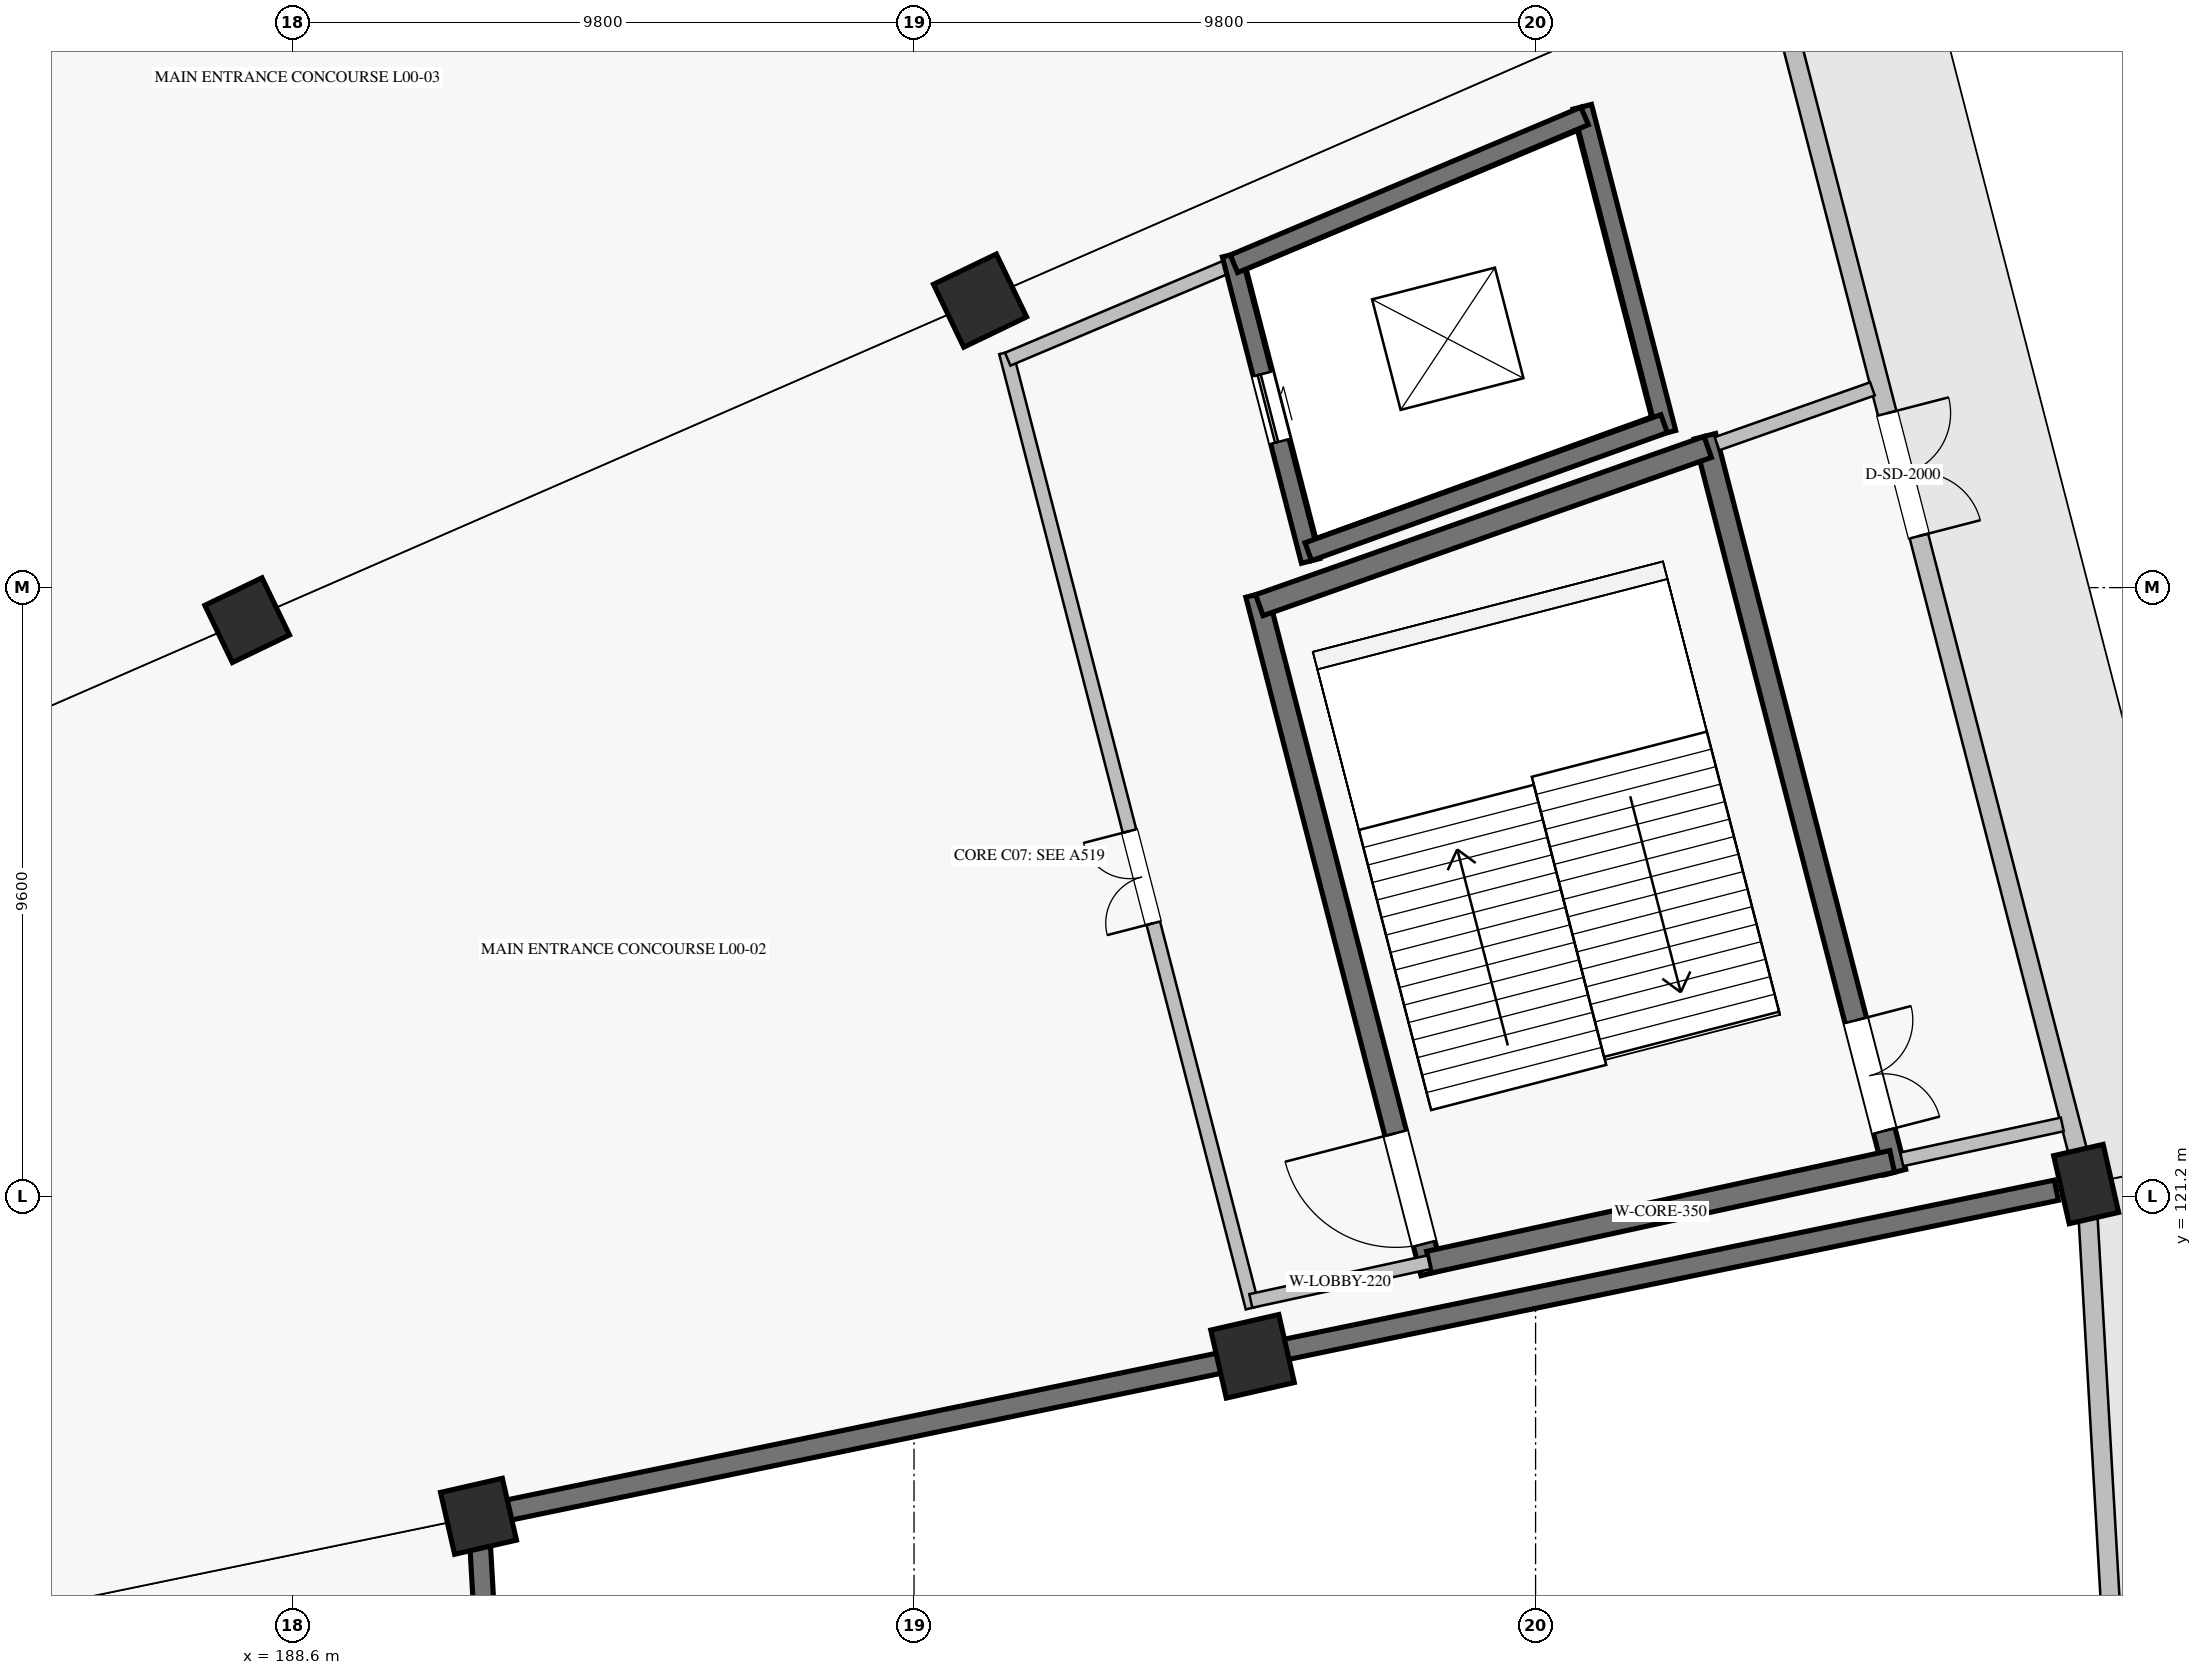
"""IFC4 building model, lengths in metres.
Left out: names, types, materials, properties, quantities, classifications, styles, units other than length and angle.
Written with IfcOpenShell. Run it as: python <this file> out.ifc"""

import sys

from ifc_helpers import new_model, si_unit, direction, frame, frame_2d, origin, origin_2d, place, context, subcontext, project, spatial, rectangle, extrude, element, fill, save


model = new_model("IFC4")
c1 = context("Model", 3, precision=1e-05, world=origin(), true_north=direction((0.0, 1.0)))
c2 = subcontext(c1, "Body", "Model", "MODEL_VIEW")
j1 = project(units=[si_unit("LENGTHUNIT", "METRE"), si_unit("PLANEANGLEUNIT", "RADIAN")], contexts=[c1])
p1 = place(None, origin())
s1 = spatial("IfcSite", under=j1, at=p1, CompositionType="ELEMENT")
p2 = place(p1, origin())
s2 = spatial("IfcBuilding", under=s1, at=p2, CompositionType="ELEMENT")
p3 = place(p2, origin())
s3 = spatial("IfcBuildingStorey", under=s2, at=p3, CompositionType="ELEMENT", Elevation=0.0)
for number, where, z_axis, x_axis in (
    (1, (191.533, 116.16, 0.0), (0.0, 0.0, 1.0), (0.975, 0.223, 0.0)),
    (2, (187.886, 130.287, 0.0), (0.0, 0.0, 1.0), (0.901, 0.434, 0.0)),
):
    element("IfcColumn", number, at=place(p3, frame(where, z_axis=z_axis, x_axis=x_axis)), inside=s3, PredefinedType="COLUMN", context=c2, shape_type="SweptSolid", body=[
        extrude(rectangle(XDim=1.0, YDim=1.0, at=origin_2d()), origin(), (0.0, 0.0, 1.0), 5.78),
    ])
for number, where, z_axis, x_axis in (
    (3, (203.738, 118.682, 0.0), (0.0, 0.0, 1.0), (0.975, 0.223, 0.0)),
    (4, (199.441, 135.325, 0.0), (0.0, 0.0, 1.0), (0.901, 0.434, 0.0)),
):
    element("IfcColumn", number, at=place(p3, frame(where, z_axis=z_axis, x_axis=x_axis)), inside=s3, PredefinedType="COLUMN", context=c2, shape_type="SweptSolid", body=[
        extrude(rectangle(XDim=1.1, YDim=1.1, at=origin_2d()), origin(), (0.0, 0.0, 1.0), 5.78),
    ])
p4 = place(p3, frame((216.881, 121.398, 0.0), z_axis=(0.0, 0.0, 1.0), x_axis=(0.974927912182, 0.222520933954, 0.0)))
e5 = element("IfcColumn", 5, at=p4, inside=s3, PredefinedType="COLUMN", context=c2, shape_type="SweptSolid", body=[
    extrude(rectangle(XDim=0.8, YDim=1.1, at=origin_2d()), origin(), (0.0, 0.0, 1.0), 5.78),
])
p5 = place(p3, frame((217.978, 102.389, 0.0), z_axis=(0.0, 0.0, 1.0), x_axis=(-0.057599295107, 0.99833978244, 0.0)))
e6 = element("IfcWall", 6, at=p5, inside=s3, PredefinedType="SOLIDWALL", context=c2, shape_type="SweptSolid", body=[
    extrude(rectangle(XDim=18.65, YDim=0.3, at=frame_2d((9.325, 0.0))), origin(), (0.0, 0.0, 1.0), 4.8),
])
p6 = place(p5, frame((7.075, 0.0, 0.0)))
e7 = element("IfcOpeningElement", 7, at=p6, cuts=e6, PredefinedType="OPENING", context=c2, shape_type="SweptSolid", body=[
    extrude(rectangle(XDim=4.5, YDim=4.2, at=frame_2d((2.25, 2.1))), frame((0.0, 0.16, 0.0), z_axis=(0.0, -1.0, 0.0), x_axis=(1.0, 0.0, 0.0)), (0.0, 0.0, 1.0), 0.32),
])
p7 = place(p3, frame((216.783, 121.775, 0.0), z_axis=(0.0, 0.0, 1.0), x_axis=(-0.249961059007, 0.968255890238, 0.0)))
e8 = element("IfcWall", 8, at=p7, inside=s3, PredefinedType="SOLIDWALL", context=c2, shape_type="SweptSolid", body=[
    extrude(rectangle(XDim=19.206, YDim=0.3, at=frame_2d((9.603, 0.0))), origin(), (0.0, 0.0, 1.0), 4.8),
])
p8 = place(p7, frame((10.16, 0.0, 0.0)))
e9 = element("IfcOpeningElement", 9, at=p8, cuts=e8, PredefinedType="OPENING", context=c2, shape_type="SweptSolid", body=[
    extrude(rectangle(XDim=2.0, YDim=2.3, at=frame_2d((1.0, 1.15))), frame((0.0, 0.16, 0.0), z_axis=(0.0, -1.0, 0.0), x_axis=(1.0, 0.0, 0.0)), (0.0, 0.0, 1.0), 0.32),
])
p9 = place(p3, frame((206.562, 119.996, 0.0), z_axis=(0.0, 0.0, 1.0), x_axis=(-0.249959564539, 0.968256276042, 0.0)))
e10 = element("IfcWall", 10, at=p9, inside=s3, PredefinedType="SHEAR", context=c2, shape_type="SweptSolid", body=[
    extrude(rectangle(XDim=11.047, YDim=0.35, at=frame_2d((5.523, 0.0))), origin(), (0.0, 0.0, 1.0), 5.5),
])
p10 = place(p9, frame((0.475, 0.0, 0.0)))
e11 = element("IfcOpeningElement", 11, at=p10, cuts=e10, PredefinedType="OPENING", context=c2, shape_type="SweptSolid", body=[
    extrude(rectangle(XDim=1.8, YDim=2.2, at=frame_2d((0.9, 1.1))), frame((0.0, 0.185, 0.0), z_axis=(0.0, -1.0, 0.0), x_axis=(1.0, 0.0, 0.0)), (0.0, 0.0, 1.0), 0.37),
])
p11 = place(p3, frame((213.866, 121.585, 0.0), z_axis=(0.0, 0.0, 1.0), x_axis=(-0.249969221583, 0.968253782983, 0.0)))
e12 = element("IfcWall", 12, at=p11, inside=s3, PredefinedType="SHEAR", context=c2, shape_type="SweptSolid", body=[
    extrude(rectangle(XDim=11.982, YDim=0.35, at=frame_2d((5.991, 0.0))), origin(), (0.0, 0.0, 1.0), 5.5),
])
p12 = place(p11, frame((0.672, 0.0, 0.0)))
e13 = element("IfcOpeningElement", 13, at=p12, cuts=e12, PredefinedType="OPENING", context=c2, shape_type="SweptSolid", body=[
    extrude(rectangle(XDim=1.8, YDim=2.2, at=frame_2d((0.9, 1.1))), frame((0.0, 0.185, 0.0), z_axis=(0.0, -1.0, 0.0), x_axis=(1.0, 0.0, 0.0)), (0.0, 0.0, 1.0), 0.37),
])
p13 = place(p3, frame((213.973, 121.787, 0.0), z_axis=(0.0, 0.0, 1.0), x_axis=(0.977161897059, 0.212496180991, 0.0)))
e14 = element("IfcWall", 14, at=p13, inside=s3, PredefinedType="SOLIDWALL", context=c2, shape_type="SweptSolid", body=[
    extrude(rectangle(XDim=2.59, YDim=0.22, at=frame_2d((1.295, 0.0))), origin(), (0.0, 0.0, 1.0), 5.5),
])
p14 = place(p3, frame((211.061, 133.069, 0.0), z_axis=(0.0, 0.0, 1.0), x_axis=(0.943023288659, 0.332726730285, 0.0)))
e15 = element("IfcWall", 15, at=p14, inside=s3, PredefinedType="SOLIDWALL", context=c2, shape_type="SweptSolid", body=[
    extrude(rectangle(XDim=2.598, YDim=0.22, at=frame_2d((1.299, 0.0))), origin(), (0.0, 0.0, 1.0), 5.5),
])
p15 = place(p3, frame((206.519, 120.166, 0.0), z_axis=(0.0, 0.0, 1.0), x_axis=(0.977149528138, 0.2125530514, 0.0)))
e16 = element("IfcWall", 16, at=p15, inside=s3, PredefinedType="SHEAR", context=c2, shape_type="SweptSolid", body=[
    extrude(rectangle(XDim=7.474, YDim=0.35, at=frame_2d((3.737, 0.0))), origin(), (0.0, 0.0, 1.0), 5.5),
])
p16 = place(p3, frame((203.845, 130.523, 0.0), z_axis=(0.0, 0.0, 1.0), x_axis=(0.943032412173, 0.332700871042, 0.0)))
e17 = element("IfcWall", 17, at=p16, inside=s3, PredefinedType="SHEAR", context=c2, shape_type="SweptSolid", body=[
    extrude(rectangle(XDim=7.497, YDim=0.35, at=frame_2d((3.748, 0.0))), origin(), (0.0, 0.0, 1.0), 5.5),
])
p17 = place(p3, frame((204.654, 131.221, 0.0), z_axis=(0.0, 0.0, 1.0), x_axis=(-0.250003862389, 0.968244839279, 0.0)))
e18 = element("IfcWall", 18, at=p17, inside=s3, PredefinedType="SHEAR", context=c2, shape_type="SweptSolid", body=[
    extrude(rectangle(XDim=4.987, YDim=0.3, at=frame_2d((2.494, 0.0))), origin(), (0.0, 0.0, 1.0), 5.5),
])
p18 = place(p17, frame((1.944, 0.0, 0.0)))
e19 = element("IfcOpeningElement", 19, at=p18, cuts=e18, PredefinedType="OPENING", context=c2, shape_type="SweptSolid", body=[
    extrude(rectangle(XDim=1.1, YDim=2.2, at=frame_2d((0.55, 1.1))), frame((0.0, 0.16, 0.0), z_axis=(0.0, -1.0, 0.0), x_axis=(1.0, 0.0, 0.0)), (0.0, 0.0, 1.0), 0.32),
])
p19 = place(p3, frame((210.264, 133.24, 0.0), z_axis=(0.0, 0.0, 1.0), x_axis=(-0.249961459705, 0.968255786795, 0.0)))
e20 = element("IfcWall", 20, at=p19, inside=s3, PredefinedType="SHEAR", context=c2, shape_type="SweptSolid", body=[
    extrude(rectangle(XDim=5.309, YDim=0.3, at=frame_2d((2.655, 0.0))), origin(), (0.0, 0.0, 1.0), 5.5),
])
p20 = place(p3, frame((204.616, 131.366, 0.0), z_axis=(0.0, 0.0, 1.0), x_axis=(0.940945340179, 0.338558513103, 0.0)))
e21 = element("IfcWall", 21, at=p20, inside=s3, PredefinedType="SHEAR", context=c2, shape_type="SweptSolid", body=[
    extrude(rectangle(XDim=5.962, YDim=0.3, at=frame_2d((2.981, 0.0))), origin(), (0.0, 0.0, 1.0), 5.5),
])
p21 = place(p3, frame((203.445, 135.905, 0.0), z_axis=(0.0, 0.0, 1.0), x_axis=(0.92149593043, 0.388388015007, 0.0)))
e22 = element("IfcWall", 22, at=p21, inside=s3, PredefinedType="SHEAR", context=c2, shape_type="SweptSolid", body=[
    extrude(rectangle(XDim=6.001, YDim=0.3, at=frame_2d((3.0, 0.0))), origin(), (0.0, 0.0, 1.0), 5.5),
])
p22 = place(p3, frame((203.737, 119.448, 0.0), z_axis=(0.0, 0.0, 1.0), x_axis=(-0.249963472505, 0.968255267176, 0.0)))
e23 = element("IfcWall", 23, at=p22, inside=s3, PredefinedType="SOLIDWALL", context=c2, shape_type="SweptSolid", body=[
    extrude(rectangle(XDim=15.553, YDim=0.22, at=frame_2d((7.776, 0.0))), origin(), (0.0, 0.0, 1.0), 4.448),
])
p23 = place(p22, frame((6.26, 0.0, 0.0)))
e24 = element("IfcOpeningElement", 24, at=p23, cuts=e23, PredefinedType="OPENING", context=c2, shape_type="SweptSolid", body=[
    extrude(rectangle(XDim=1.5, YDim=2.2, at=frame_2d((0.75, 1.1))), frame((0.0, 0.12, 0.0), z_axis=(0.0, -1.0, 0.0), x_axis=(1.0, 0.0, 0.0)), (0.0, 0.0, 1.0), 0.24),
])
p24 = place(p3, frame((203.71, 119.555, 0.0), z_axis=(0.0, 0.0, 1.0), x_axis=(0.977160263607, 0.212503692268, 0.0)))
e25 = element("IfcWall", 25, at=p24, inside=s3, PredefinedType="SOLIDWALL", context=c2, shape_type="SweptSolid", body=[
    extrude(rectangle(XDim=2.875, YDim=0.22, at=frame_2d((1.437, 0.0))), origin(), (0.0, 0.0, 1.0), 5.5),
])
p25 = place(p3, frame((199.877, 134.401, 0.0), z_axis=(0.0, 0.0, 1.0), x_axis=(0.921486922561, 0.388409386535, 0.0)))
e26 = element("IfcWall", 26, at=p25, inside=s3, PredefinedType="SOLIDWALL", context=c2, shape_type="SweptSolid", body=[
    extrude(rectangle(XDim=3.871, YDim=0.22, at=frame_2d((1.936, 0.0))), origin(), (0.0, 0.0, 1.0), 5.5),
])
p26 = place(p3, frame((192.322, 102.479, 0.0), z_axis=(0.0, 0.0, 1.0), x_axis=(-0.057601843043, 0.998339635434, 0.0)))
e27 = element("IfcWall", 27, at=p26, inside=s3, PredefinedType="SHEAR", context=c2, shape_type="SweptSolid", body=[
    extrude(rectangle(XDim=13.224, YDim=0.325, at=frame_2d((6.612, 0.0))), origin(), (0.0, 0.0, 1.0), 4.8),
])
p27 = place(p3, frame((192.003, 116.257, 0.0), z_axis=(0.0, 0.0, 1.0), x_axis=(0.979312995501, 0.202351320337, 0.0)))
e28 = element("IfcWall", 28, at=p27, inside=s3, PredefinedType="SHEAR", context=c2, shape_type="SweptSolid", body=[
    extrude(rectangle(XDim=24.923, YDim=0.325, at=frame_2d((12.461, 0.0))), origin(), (0.0, 0.0, 1.0), 4.8),
])
p28 = place(p8, frame((2.0, 0.0, 0.0), z_axis=(0.0, 0.0, 1.0), x_axis=(-1.0, 0.0, 0.0)))
e29 = element("IfcDoor", 29, at=p28, inside=s3, OperationType="DOUBLE_DOOR_SINGLE_SWING", PredefinedType="DOOR", context=c2, shape_type="SweptSolid", body=[
    extrude(rectangle(XDim=2.0, YDim=2.3, at=frame_2d((1.0, 1.15))), frame((0.0, 0.025, 0.0), z_axis=(0.0, -1.0, 0.0), x_axis=(1.0, 0.0, 0.0)), (0.0, 0.0, 1.0), 0.05),
])
fill(e9, e29)
p29 = place(p12, frame((1.8, 0.0, 0.0), z_axis=(0.0, 0.0, 1.0), x_axis=(-1.0, 0.0, 0.0)))
e30 = element("IfcDoor", 30, at=p29, inside=s3, OperationType="DOUBLE_DOOR_SINGLE_SWING", PredefinedType="DOOR", context=c2, shape_type="SweptSolid", body=[
    extrude(rectangle(XDim=1.8, YDim=2.2, at=frame_2d((0.9, 1.1))), frame((0.0, 0.025, 0.0), z_axis=(0.0, -1.0, 0.0), x_axis=(1.0, 0.0, 0.0)), (0.0, 0.0, 1.0), 0.05),
])
fill(e13, e30)
p30 = place(p10, origin())
e31 = element("IfcDoor", 31, at=p30, inside=s3, OperationType="SINGLE_SWING_RIGHT", PredefinedType="DOOR", context=c2, shape_type="SweptSolid", body=[
    extrude(rectangle(XDim=1.8, YDim=2.2, at=frame_2d((0.9, 1.1))), frame((0.0, 0.025, 0.0), z_axis=(0.0, -1.0, 0.0), x_axis=(1.0, 0.0, 0.0)), (0.0, 0.0, 1.0), 0.05),
])
fill(e11, e31)
p31 = place(p18, origin())
e32 = element("IfcDoor", 32, at=p31, inside=s3, OperationType="SLIDING_TO_RIGHT", PredefinedType="DOOR", context=c2, shape_type="SweptSolid", body=[
    extrude(rectangle(XDim=1.1, YDim=2.2, at=frame_2d((0.55, 1.1))), frame((0.0, 0.025, 0.0), z_axis=(0.0, -1.0, 0.0), x_axis=(1.0, 0.0, 0.0)), (0.0, 0.0, 1.0), 0.05),
])
fill(e19, e32)
p32 = place(p23, origin())
e33 = element("IfcDoor", 33, at=p32, inside=s3, OperationType="DOUBLE_DOOR_SINGLE_SWING", PredefinedType="DOOR", context=c2, shape_type="SweptSolid", body=[
    extrude(rectangle(XDim=1.5, YDim=2.2, at=frame_2d((0.75, 1.1))), frame((0.0, 0.025, 0.0), z_axis=(0.0, -1.0, 0.0), x_axis=(1.0, 0.0, 0.0)), (0.0, 0.0, 1.0), 0.05),
])
fill(e24, e33)
save(model, sys.argv[1])
